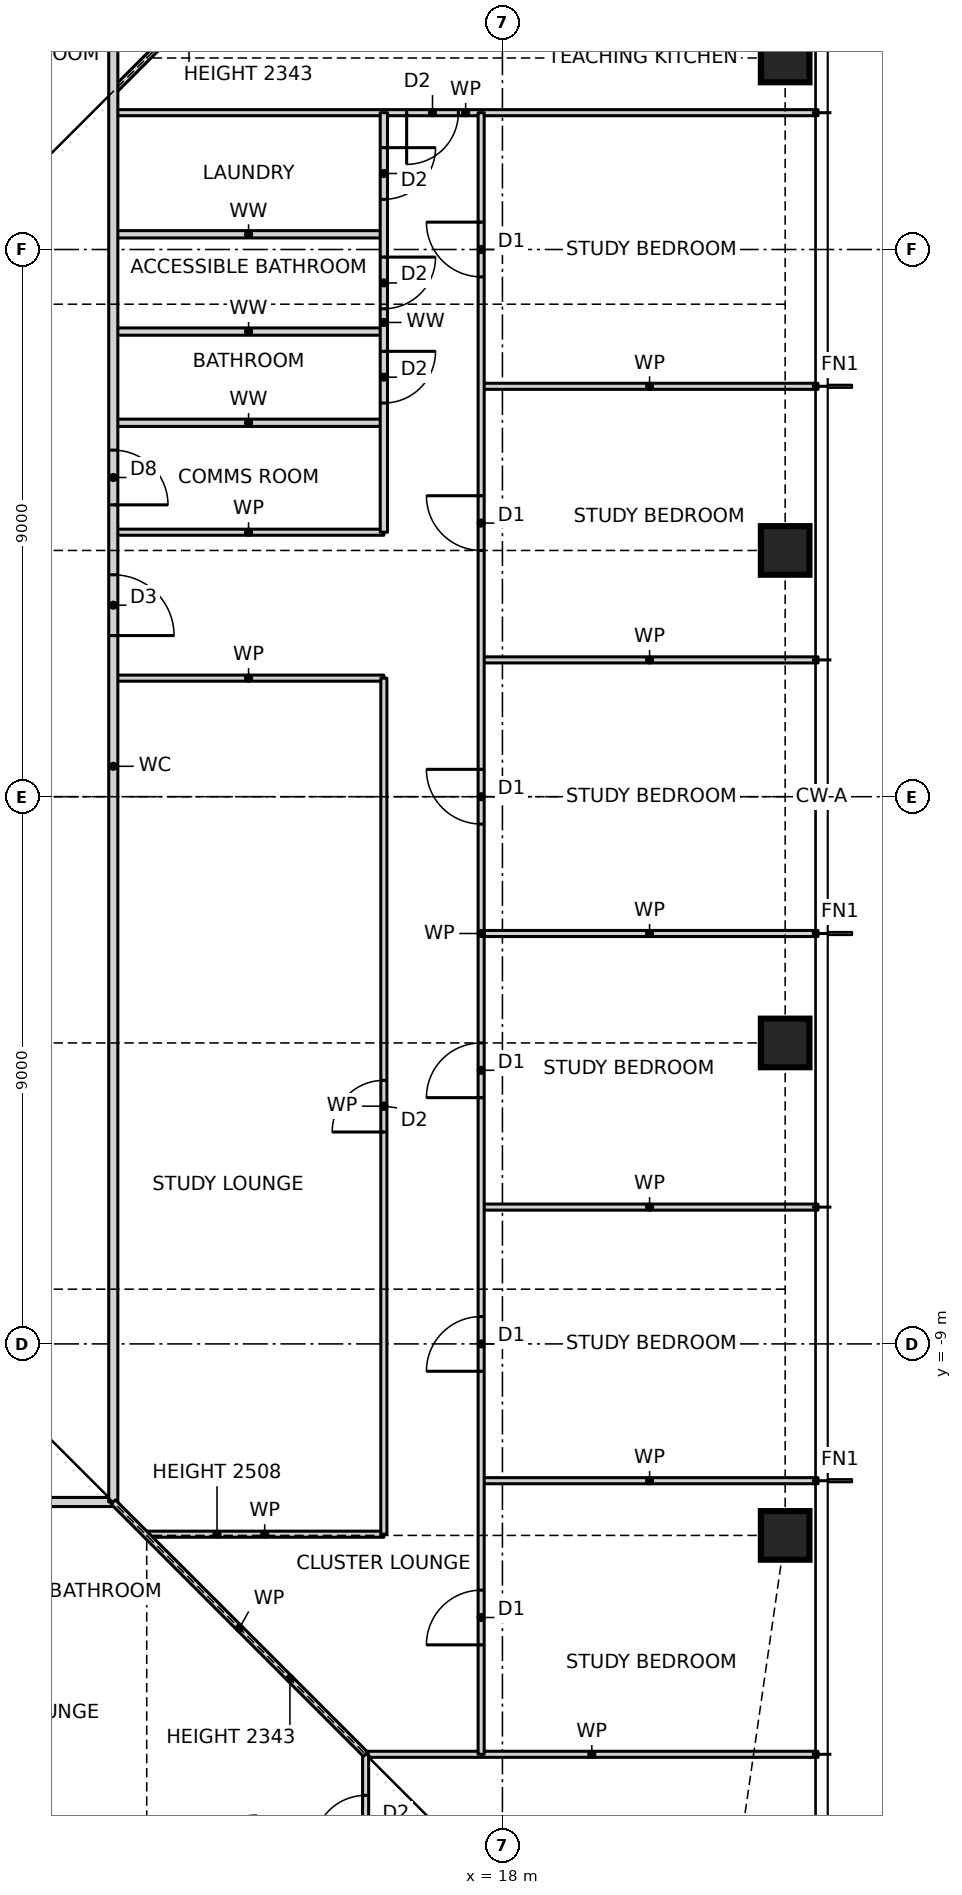
"""IFC4 building model, lengths in metres.
Left out: names, types, materials, properties, quantities, classifications, styles, units other than length and angle.
Written with IfcOpenShell. Run it as: python <this file> out.ifc"""

import sys

from ifc_helpers import new_model, si_unit, direction, frame, frame_2d, origin, origin_2d, place, context, subcontext, project, spatial, rectangle, hollow_rectangle, extrude, element, fill, save


model = new_model("IFC4")
c1 = context("Model", 3, precision=1e-05, world=origin(), true_north=direction((0.0, 1.0)))
c2 = subcontext(c1, "Body", "Model", "MODEL_VIEW")
j1 = project(units=[si_unit("LENGTHUNIT", "METRE"), si_unit("PLANEANGLEUNIT", "RADIAN")], contexts=[c1])
p1 = place(None, origin())
s1 = spatial("IfcSite", under=j1, at=p1, CompositionType="ELEMENT")
p2 = place(p1, origin())
s2 = spatial("IfcBuilding", under=s1, at=p2, CompositionType="ELEMENT")
p3 = place(p2, frame((0.0, 0.0, 64.0)))
s3 = spatial("IfcBuildingStorey", under=s2, at=p3, CompositionType="ELEMENT", Elevation=64.0)
for number, where, z_axis, x_axis in (
    (1, (22.65, -12.15, 0.0), (0.0, 0.0, 1.0), (1.0, 0.0, 0.0)),
    (2, (22.65, -4.05, 0.0), (0.0, 0.0, 1.0), (1.0, 0.0, 0.0)),
    (3, (22.65, 4.05, 0.0), (0.0, 0.0, 1.0), (1.0, 0.0, 0.0)),
    (4, (22.65, 12.15, 0.0), (0.0, 0.0, 1.0), (1.0, 0.0, 0.0)),
):
    element("IfcColumn", number, at=place(p3, frame(where, z_axis=z_axis, x_axis=x_axis)), inside=s3, PredefinedType="COLUMN", context=c2, shape_type="SweptSolid", body=[
        extrude(hollow_rectangle(XDim=0.8, YDim=0.8, WallThickness=0.09, at=origin_2d()), origin(), (0.0, 0.0, 1.0), 3.5),
    ])
p4 = place(p3, frame((15.75, -15.75, 0.0), z_axis=(0.0, 0.0, 1.0), x_axis=(1.0, 0.0, 0.0)))
e5 = element("IfcWall", 5, at=p4, inside=s3, PredefinedType="PARTITIONING", context=c2, shape_type="SweptSolid", body=[
    extrude(rectangle(XDim=7.44, YDim=0.1, at=frame_2d((3.72, 0.0))), origin(), (0.0, 0.0, 1.0), 3.27),
])
p5 = place(p3, frame((12.13, -12.13, 0.0), z_axis=(0.0, 0.0, 1.0), x_axis=(1.0, 0.0, 0.0)))
e6 = element("IfcWall", 6, at=p5, inside=s3, PredefinedType="PARTITIONING", context=c2, shape_type="SweptSolid", body=[
    extrude(rectangle(XDim=3.92, YDim=0.1, at=frame_2d((1.96, 0.0))), origin(), (0.0, 0.0, 1.0), 2.508),
])
p6 = place(p3, frame((-11.6, -11.6, 0.0), z_axis=(0.0, 0.0, 1.0), x_axis=(1.0, 0.0, 0.0)))
e7 = element("IfcWall", 7, at=p6, inside=s3, PredefinedType="PARTITIONING", context=c2, shape_type="SweptSolid", body=[
    extrude(rectangle(XDim=23.2, YDim=0.15, at=frame_2d((11.6, 0.0))), origin(), (0.0, 0.0, 1.0), 3.27),
])
p7 = place(p6, frame((1.755, 0.0, 0.0)))
e8 = element("IfcOpeningElement", 8, at=p7, cuts=e7, PredefinedType="OPENING", context=c2, shape_type="SweptSolid", body=[
    extrude(rectangle(XDim=1.0, YDim=2.1, at=frame_2d((0.5, 1.05))), frame((0.0, 0.085, 0.0), z_axis=(0.0, -1.0, 0.0), x_axis=(1.0, 0.0, 0.0)), (0.0, 0.0, 1.0), 0.17),
])
p8 = place(p6, frame((21.025, 0.0, 0.0)))
e9 = element("IfcOpeningElement", 9, at=p8, cuts=e7, PredefinedType="OPENING", context=c2, shape_type="SweptSolid", body=[
    extrude(rectangle(XDim=1.0, YDim=2.1, at=frame_2d((0.5, 1.05))), frame((0.0, 0.085, 0.0), z_axis=(0.0, -1.0, 0.0), x_axis=(1.0, 0.0, 0.0)), (0.0, 0.0, 1.0), 0.17),
])
for number, where, z_axis, x_axis in (
    (10, (17.65, -11.25, 0.0), (0.0, 0.0, 1.0), (1.0, 0.0, 0.0)),
    (11, (17.65, -6.75, 0.0), (0.0, 0.0, 1.0), (1.0, 0.0, 0.0)),
    (12, (17.65, -2.25, 0.0), (0.0, 0.0, 1.0), (1.0, 0.0, 0.0)),
):
    element("IfcWall", number, at=place(p3, frame(where, z_axis=z_axis, x_axis=x_axis)), inside=s3, PredefinedType="PARTITIONING", context=c2, shape_type="SweptSolid", body=[
        extrude(rectangle(XDim=5.54, YDim=0.1, at=frame_2d((2.77, 0.0))), origin(), (0.0, 0.0, 1.0), 3.27),
    ])
p9 = place(p3, frame((11.6, 1.95, 0.0), z_axis=(0.0, 0.0, 1.0), x_axis=(1.0, 0.0, 0.0)))
e13 = element("IfcWall", 13, at=p9, inside=s3, PredefinedType="PARTITIONING", context=c2, shape_type="SweptSolid", body=[
    extrude(rectangle(XDim=4.45, YDim=0.1, at=frame_2d((2.225, 0.0))), origin(), (0.0, 0.0, 1.0), 3.27),
])
p10 = place(p3, frame((17.65, 2.25, 0.0), z_axis=(0.0, 0.0, 1.0), x_axis=(1.0, 0.0, 0.0)))
e14 = element("IfcWall", 14, at=p10, inside=s3, PredefinedType="PARTITIONING", context=c2, shape_type="SweptSolid", body=[
    extrude(rectangle(XDim=5.54, YDim=0.1, at=frame_2d((2.77, 0.0))), origin(), (0.0, 0.0, 1.0), 3.27),
])
p11 = place(p3, frame((11.6, 4.35, 0.0), z_axis=(0.0, 0.0, 1.0), x_axis=(1.0, 0.0, 0.0)))
e15 = element("IfcWall", 15, at=p11, inside=s3, PredefinedType="PARTITIONING", context=c2, shape_type="SweptSolid", body=[
    extrude(rectangle(XDim=4.45, YDim=0.1, at=frame_2d((2.225, 0.0))), origin(), (0.0, 0.0, 1.0), 3.27),
])
p12 = place(p3, frame((11.6, 6.15, 0.0), z_axis=(0.0, 0.0, 1.0), x_axis=(1.0, 0.0, 0.0)))
e16 = element("IfcWall", 16, at=p12, inside=s3, PredefinedType="PARTITIONING", context=c2, shape_type="SweptSolid", body=[
    extrude(rectangle(XDim=4.45, YDim=0.12, at=frame_2d((2.225, 0.0))), origin(), (0.0, 0.0, 1.0), 3.27),
])
p13 = place(p3, frame((17.65, 6.75, 0.0), z_axis=(0.0, 0.0, 1.0), x_axis=(1.0, 0.0, 0.0)))
e17 = element("IfcWall", 17, at=p13, inside=s3, PredefinedType="PARTITIONING", context=c2, shape_type="SweptSolid", body=[
    extrude(rectangle(XDim=5.54, YDim=0.1, at=frame_2d((2.77, 0.0))), origin(), (0.0, 0.0, 1.0), 3.27),
])
for number, where, z_axis, x_axis in (
    (18, (11.6, 7.65, 0.0), (0.0, 0.0, 1.0), (1.0, 0.0, 0.0)),
    (19, (11.6, 9.25, 0.0), (0.0, 0.0, 1.0), (1.0, 0.0, 0.0)),
):
    element("IfcWall", number, at=place(p3, frame(where, z_axis=z_axis, x_axis=x_axis)), inside=s3, PredefinedType="PARTITIONING", context=c2, shape_type="SweptSolid", body=[
        extrude(rectangle(XDim=4.45, YDim=0.12, at=frame_2d((2.225, 0.0))), origin(), (0.0, 0.0, 1.0), 3.27),
    ])
p14 = place(p3, frame((11.6, 11.25, 0.0), z_axis=(0.0, 0.0, 1.0), x_axis=(1.0, 0.0, 0.0)))
e20 = element("IfcWall", 20, at=p14, inside=s3, PredefinedType="PARTITIONING", context=c2, shape_type="SweptSolid", body=[
    extrude(rectangle(XDim=11.59, YDim=0.1, at=frame_2d((5.795, 0.0))), origin(), (0.0, 0.0, 1.0), 3.27),
])
p15 = place(p14, frame((4.825, 0.0, 0.0)))
e21 = element("IfcOpeningElement", 21, at=p15, cuts=e20, PredefinedType="OPENING", context=c2, shape_type="SweptSolid", body=[
    extrude(rectangle(XDim=0.85, YDim=2.1, at=frame_2d((0.425, 1.05))), frame((0.0, 0.06, 0.0), z_axis=(0.0, -1.0, 0.0), x_axis=(1.0, 0.0, 0.0)), (0.0, 0.0, 1.0), 0.12),
])
p16 = place(p3, frame((11.6, 11.6, 0.0), z_axis=(0.0, 0.0, 1.0), x_axis=(0.707106781187, 0.707106781187, 0.0)))
e22 = element("IfcWall", 22, at=p16, inside=s3, PredefinedType="PARTITIONING", context=c2, shape_type="SweptSolid", body=[
    extrude(rectangle(XDim=5.869, YDim=0.1, at=frame_2d((2.935, 0.0))), origin(), (0.0, 0.0, 1.0), 2.343),
])
p17 = place(p3, frame((17.65, -15.75, 0.0), z_axis=(0.0, 0.0, 1.0), x_axis=(0.0, 1.0, 0.0)))
e23 = element("IfcWall", 23, at=p17, inside=s3, PredefinedType="PARTITIONING", context=c2, shape_type="SweptSolid", body=[
    extrude(rectangle(XDim=27.0, YDim=0.1, at=frame_2d((13.5, 0.0))), origin(), (0.0, 0.0, 1.0), 3.27),
])
p18 = place(p17, frame((1.8, 0.0, 0.0)))
e24 = element("IfcOpeningElement", 24, at=p18, cuts=e23, PredefinedType="OPENING", context=c2, shape_type="SweptSolid", body=[
    extrude(rectangle(XDim=0.9, YDim=2.1, at=frame_2d((0.45, 1.05))), frame((0.0, 0.06, 0.0), z_axis=(0.0, -1.0, 0.0), x_axis=(1.0, 0.0, 0.0)), (0.0, 0.0, 1.0), 0.12),
])
p19 = place(p17, frame((6.3, 0.0, 0.0)))
e25 = element("IfcOpeningElement", 25, at=p19, cuts=e23, PredefinedType="OPENING", context=c2, shape_type="SweptSolid", body=[
    extrude(rectangle(XDim=0.9, YDim=2.1, at=frame_2d((0.45, 1.05))), frame((0.0, 0.06, 0.0), z_axis=(0.0, -1.0, 0.0), x_axis=(1.0, 0.0, 0.0)), (0.0, 0.0, 1.0), 0.12),
])
p20 = place(p17, frame((10.8, 0.0, 0.0)))
e26 = element("IfcOpeningElement", 26, at=p20, cuts=e23, PredefinedType="OPENING", context=c2, shape_type="SweptSolid", body=[
    extrude(rectangle(XDim=0.9, YDim=2.1, at=frame_2d((0.45, 1.05))), frame((0.0, 0.06, 0.0), z_axis=(0.0, -1.0, 0.0), x_axis=(1.0, 0.0, 0.0)), (0.0, 0.0, 1.0), 0.12),
])
p21 = place(p17, frame((15.3, 0.0, 0.0)))
e27 = element("IfcOpeningElement", 27, at=p21, cuts=e23, PredefinedType="OPENING", context=c2, shape_type="SweptSolid", body=[
    extrude(rectangle(XDim=0.9, YDim=2.1, at=frame_2d((0.45, 1.05))), frame((0.0, 0.06, 0.0), z_axis=(0.0, -1.0, 0.0), x_axis=(1.0, 0.0, 0.0)), (0.0, 0.0, 1.0), 0.12),
])
p22 = place(p17, frame((19.8, 0.0, 0.0)))
e28 = element("IfcOpeningElement", 28, at=p22, cuts=e23, PredefinedType="OPENING", context=c2, shape_type="SweptSolid", body=[
    extrude(rectangle(XDim=0.9, YDim=2.1, at=frame_2d((0.45, 1.05))), frame((0.0, 0.06, 0.0), z_axis=(0.0, -1.0, 0.0), x_axis=(1.0, 0.0, 0.0)), (0.0, 0.0, 1.0), 0.12),
])
p23 = place(p17, frame((24.3, 0.0, 0.0)))
e29 = element("IfcOpeningElement", 29, at=p23, cuts=e23, PredefinedType="OPENING", context=c2, shape_type="SweptSolid", body=[
    extrude(rectangle(XDim=0.9, YDim=2.1, at=frame_2d((0.45, 1.05))), frame((0.0, 0.06, 0.0), z_axis=(0.0, -1.0, 0.0), x_axis=(1.0, 0.0, 0.0)), (0.0, 0.0, 1.0), 0.12),
])
p24 = place(p3, frame((16.05, -12.13, 0.0), z_axis=(0.0, 0.0, 1.0), x_axis=(0.0, 1.0, 0.0)))
e30 = element("IfcWall", 30, at=p24, inside=s3, PredefinedType="PARTITIONING", context=c2, shape_type="SweptSolid", body=[
    extrude(rectangle(XDim=14.08, YDim=0.1, at=frame_2d((7.04, 0.0))), origin(), (0.0, 0.0, 1.0), 3.27),
])
p25 = place(p24, frame((6.615, 0.0, 0.0)))
e31 = element("IfcOpeningElement", 31, at=p25, cuts=e30, PredefinedType="OPENING", context=c2, shape_type="SweptSolid", body=[
    extrude(rectangle(XDim=0.85, YDim=2.1, at=frame_2d((0.425, 1.05))), frame((0.0, 0.06, 0.0), z_axis=(0.0, -1.0, 0.0), x_axis=(1.0, 0.0, 0.0)), (0.0, 0.0, 1.0), 0.12),
])
p26 = place(p3, frame((16.05, 4.35, 0.0), z_axis=(0.0, 0.0, 1.0), x_axis=(0.0, 1.0, 0.0)))
e32 = element("IfcWall", 32, at=p26, inside=s3, PredefinedType="PARTITIONING", context=c2, shape_type="SweptSolid", body=[
    extrude(rectangle(XDim=6.9, YDim=0.12, at=frame_2d((3.45, 0.0))), origin(), (0.0, 0.0, 1.0), 3.27),
])
p27 = place(p26, frame((2.125, 0.0, 0.0)))
e33 = element("IfcOpeningElement", 33, at=p27, cuts=e32, PredefinedType="OPENING", context=c2, shape_type="SweptSolid", body=[
    extrude(rectangle(XDim=0.85, YDim=2.1, at=frame_2d((0.425, 1.05))), frame((0.0, 0.07, 0.0), z_axis=(0.0, -1.0, 0.0), x_axis=(1.0, 0.0, 0.0)), (0.0, 0.0, 1.0), 0.14),
])
p28 = place(p26, frame((3.675, 0.0, 0.0)))
e34 = element("IfcOpeningElement", 34, at=p28, cuts=e32, PredefinedType="OPENING", context=c2, shape_type="SweptSolid", body=[
    extrude(rectangle(XDim=0.85, YDim=2.1, at=frame_2d((0.425, 1.05))), frame((0.0, 0.07, 0.0), z_axis=(0.0, -1.0, 0.0), x_axis=(1.0, 0.0, 0.0)), (0.0, 0.0, 1.0), 0.14),
])
p29 = place(p26, frame((5.475, 0.0, 0.0)))
e35 = element("IfcOpeningElement", 35, at=p29, cuts=e32, PredefinedType="OPENING", context=c2, shape_type="SweptSolid", body=[
    extrude(rectangle(XDim=0.85, YDim=2.1, at=frame_2d((0.425, 1.05))), frame((0.0, 0.07, 0.0), z_axis=(0.0, -1.0, 0.0), x_axis=(1.0, 0.0, 0.0)), (0.0, 0.0, 1.0), 0.14),
])
p30 = place(p3, frame((15.75, -23.19, 0.0), z_axis=(0.0, 0.0, 1.0), x_axis=(0.0, 1.0, 0.0)))
e36 = element("IfcWall", 36, at=p30, inside=s3, PredefinedType="PARTITIONING", context=c2, shape_type="SweptSolid", body=[
    extrude(rectangle(XDim=7.44, YDim=0.1, at=frame_2d((3.72, 0.0))), origin(), (0.0, 0.0, 1.0), 3.27),
])
p31 = place(p30, frame((5.915, 0.0, 0.0)))
e37 = element("IfcOpeningElement", 37, at=p31, cuts=e36, PredefinedType="OPENING", context=c2, shape_type="SweptSolid", body=[
    extrude(rectangle(XDim=0.85, YDim=2.1, at=frame_2d((0.425, 1.05))), frame((0.0, 0.06, 0.0), z_axis=(0.0, -1.0, 0.0), x_axis=(1.0, 0.0, 0.0)), (0.0, 0.0, 1.0), 0.12),
])
p32 = place(p3, frame((11.6, -11.6, 0.0), z_axis=(0.0, 0.0, 1.0), x_axis=(0.0, 1.0, 0.0)))
e38 = element("IfcWall", 38, at=p32, inside=s3, PredefinedType="PARTITIONING", context=c2, shape_type="SweptSolid", body=[
    extrude(rectangle(XDim=24.2, YDim=0.15, at=frame_2d((12.1, 0.0))), origin(), (0.0, 0.0, 1.0), 3.27),
])
p33 = place(p32, frame((14.25, 0.0, 0.0)))
e39 = element("IfcOpeningElement", 39, at=p33, cuts=e38, PredefinedType="OPENING", context=c2, shape_type="SweptSolid", body=[
    extrude(rectangle(XDim=1.0, YDim=2.1, at=frame_2d((0.5, 1.05))), frame((0.0, 0.085, 0.0), z_axis=(0.0, -1.0, 0.0), x_axis=(1.0, 0.0, 0.0)), (0.0, 0.0, 1.0), 0.17),
])
p34 = place(p32, frame((16.4, 0.0, 0.0)))
e40 = element("IfcOpeningElement", 40, at=p34, cuts=e38, PredefinedType="OPENING", context=c2, shape_type="SweptSolid", body=[
    extrude(rectangle(XDim=0.9, YDim=2.1, at=frame_2d((0.45, 1.05))), frame((0.0, 0.085, 0.0), z_axis=(0.0, -1.0, 0.0), x_axis=(1.0, 0.0, 0.0)), (0.0, 0.0, 1.0), 0.17),
])
p35 = place(p3, frame((15.75, -15.75, 0.0), z_axis=(0.0, 0.0, 1.0), x_axis=(-0.707106781187, 0.707106781187, 0.0)))
e41 = element("IfcWall", 41, at=p35, inside=s3, PredefinedType="PARTITIONING", context=c2, shape_type="SweptSolid", body=[
    extrude(rectangle(XDim=5.869, YDim=0.1, at=frame_2d((2.935, 0.0))), origin(), (0.0, 0.0, 1.0), 2.343),
])
p36 = place(p18, origin())
e42 = element("IfcDoor", 42, at=p36, inside=s3, OperationType="SINGLE_SWING_LEFT", PredefinedType="DOOR", context=c2, shape_type="SweptSolid", body=[
    extrude(rectangle(XDim=0.9, YDim=2.1, at=frame_2d((0.45, 1.05))), frame((0.0, 0.025, 0.0), z_axis=(0.0, -1.0, 0.0), x_axis=(1.0, 0.0, 0.0)), (0.0, 0.0, 1.0), 0.05),
])
fill(e24, e42)
p37 = place(p19, origin())
e43 = element("IfcDoor", 43, at=p37, inside=s3, OperationType="SINGLE_SWING_LEFT", PredefinedType="DOOR", context=c2, shape_type="SweptSolid", body=[
    extrude(rectangle(XDim=0.9, YDim=2.1, at=frame_2d((0.45, 1.05))), frame((0.0, 0.025, 0.0), z_axis=(0.0, -1.0, 0.0), x_axis=(1.0, 0.0, 0.0)), (0.0, 0.0, 1.0), 0.05),
])
fill(e25, e43)
p38 = place(p20, origin())
e44 = element("IfcDoor", 44, at=p38, inside=s3, OperationType="SINGLE_SWING_LEFT", PredefinedType="DOOR", context=c2, shape_type="SweptSolid", body=[
    extrude(rectangle(XDim=0.9, YDim=2.1, at=frame_2d((0.45, 1.05))), frame((0.0, 0.025, 0.0), z_axis=(0.0, -1.0, 0.0), x_axis=(1.0, 0.0, 0.0)), (0.0, 0.0, 1.0), 0.05),
])
fill(e26, e44)
p39 = place(p21, origin())
e45 = element("IfcDoor", 45, at=p39, inside=s3, OperationType="SINGLE_SWING_RIGHT", PredefinedType="DOOR", context=c2, shape_type="SweptSolid", body=[
    extrude(rectangle(XDim=0.9, YDim=2.1, at=frame_2d((0.45, 1.05))), frame((0.0, 0.025, 0.0), z_axis=(0.0, -1.0, 0.0), x_axis=(1.0, 0.0, 0.0)), (0.0, 0.0, 1.0), 0.05),
])
fill(e27, e45)
p40 = place(p22, origin())
e46 = element("IfcDoor", 46, at=p40, inside=s3, OperationType="SINGLE_SWING_RIGHT", PredefinedType="DOOR", context=c2, shape_type="SweptSolid", body=[
    extrude(rectangle(XDim=0.9, YDim=2.1, at=frame_2d((0.45, 1.05))), frame((0.0, 0.025, 0.0), z_axis=(0.0, -1.0, 0.0), x_axis=(1.0, 0.0, 0.0)), (0.0, 0.0, 1.0), 0.05),
])
fill(e28, e46)
p41 = place(p23, origin())
e47 = element("IfcDoor", 47, at=p41, inside=s3, OperationType="SINGLE_SWING_RIGHT", PredefinedType="DOOR", context=c2, shape_type="SweptSolid", body=[
    extrude(rectangle(XDim=0.9, YDim=2.1, at=frame_2d((0.45, 1.05))), frame((0.0, 0.025, 0.0), z_axis=(0.0, -1.0, 0.0), x_axis=(1.0, 0.0, 0.0)), (0.0, 0.0, 1.0), 0.05),
])
fill(e29, e47)
p42 = place(p33, frame((1.0, 0.0, 0.0), z_axis=(0.0, 0.0, 1.0), x_axis=(-1.0, 0.0, 0.0)))
e48 = element("IfcDoor", 48, at=p42, inside=s3, OperationType="SINGLE_SWING_RIGHT", PredefinedType="DOOR", context=c2, shape_type="SweptSolid", body=[
    extrude(rectangle(XDim=1.0, YDim=2.1, at=frame_2d((0.5, 1.05))), frame((0.0, 0.025, 0.0), z_axis=(0.0, -1.0, 0.0), x_axis=(1.0, 0.0, 0.0)), (0.0, 0.0, 1.0), 0.05),
])
fill(e39, e48)
p43 = place(p25, origin())
e49 = element("IfcDoor", 49, at=p43, inside=s3, OperationType="SINGLE_SWING_LEFT", PredefinedType="DOOR", context=c2, shape_type="SweptSolid", body=[
    extrude(rectangle(XDim=0.85, YDim=2.1, at=frame_2d((0.425, 1.05))), frame((0.0, 0.025, 0.0), z_axis=(0.0, -1.0, 0.0), x_axis=(1.0, 0.0, 0.0)), (0.0, 0.0, 1.0), 0.05),
])
fill(e31, e49)
p44 = place(p34, frame((0.9, 0.0, 0.0), z_axis=(0.0, 0.0, 1.0), x_axis=(-1.0, 0.0, 0.0)))
e50 = element("IfcDoor", 50, at=p44, inside=s3, OperationType="SINGLE_SWING_RIGHT", PredefinedType="DOOR", context=c2, shape_type="SweptSolid", body=[
    extrude(rectangle(XDim=0.9, YDim=2.1, at=frame_2d((0.45, 1.05))), frame((0.0, 0.025, 0.0), z_axis=(0.0, -1.0, 0.0), x_axis=(1.0, 0.0, 0.0)), (0.0, 0.0, 1.0), 0.05),
])
fill(e40, e50)
p45 = place(p27, frame((0.85, 0.0, 0.0), z_axis=(0.0, 0.0, 1.0), x_axis=(-1.0, 0.0, 0.0)))
e51 = element("IfcDoor", 51, at=p45, inside=s3, OperationType="SINGLE_SWING_LEFT", PredefinedType="DOOR", context=c2, shape_type="SweptSolid", body=[
    extrude(rectangle(XDim=0.85, YDim=2.1, at=frame_2d((0.425, 1.05))), frame((0.0, 0.025, 0.0), z_axis=(0.0, -1.0, 0.0), x_axis=(1.0, 0.0, 0.0)), (0.0, 0.0, 1.0), 0.05),
])
fill(e33, e51)
p46 = place(p28, frame((0.85, 0.0, 0.0), z_axis=(0.0, 0.0, 1.0), x_axis=(-1.0, 0.0, 0.0)))
e52 = element("IfcDoor", 52, at=p46, inside=s3, OperationType="SINGLE_SWING_LEFT", PredefinedType="DOOR", context=c2, shape_type="SweptSolid", body=[
    extrude(rectangle(XDim=0.85, YDim=2.1, at=frame_2d((0.425, 1.05))), frame((0.0, 0.025, 0.0), z_axis=(0.0, -1.0, 0.0), x_axis=(1.0, 0.0, 0.0)), (0.0, 0.0, 1.0), 0.05),
])
fill(e34, e52)
p47 = place(p29, frame((0.85, 0.0, 0.0), z_axis=(0.0, 0.0, 1.0), x_axis=(-1.0, 0.0, 0.0)))
e53 = element("IfcDoor", 53, at=p47, inside=s3, OperationType="SINGLE_SWING_LEFT", PredefinedType="DOOR", context=c2, shape_type="SweptSolid", body=[
    extrude(rectangle(XDim=0.85, YDim=2.1, at=frame_2d((0.425, 1.05))), frame((0.0, 0.025, 0.0), z_axis=(0.0, -1.0, 0.0), x_axis=(1.0, 0.0, 0.0)), (0.0, 0.0, 1.0), 0.05),
])
fill(e35, e53)
p48 = place(p15, frame((0.85, 0.0, 0.0), z_axis=(0.0, 0.0, 1.0), x_axis=(-1.0, 0.0, 0.0)))
e54 = element("IfcDoor", 54, at=p48, inside=s3, OperationType="SINGLE_SWING_RIGHT", PredefinedType="DOOR", context=c2, shape_type="SweptSolid", body=[
    extrude(rectangle(XDim=0.85, YDim=2.1, at=frame_2d((0.425, 1.05))), frame((0.0, 0.025, 0.0), z_axis=(0.0, -1.0, 0.0), x_axis=(1.0, 0.0, 0.0)), (0.0, 0.0, 1.0), 0.05),
])
fill(e21, e54)
p49 = place(p31, origin())
e55 = element("IfcDoor", 55, at=p49, inside=s3, OperationType="SINGLE_SWING_LEFT", PredefinedType="DOOR", context=c2, shape_type="SweptSolid", body=[
    extrude(rectangle(XDim=0.85, YDim=2.1, at=frame_2d((0.425, 1.05))), frame((0.0, 0.025, 0.0), z_axis=(0.0, -1.0, 0.0), x_axis=(1.0, 0.0, 0.0)), (0.0, 0.0, 1.0), 0.05),
])
fill(e37, e55)
save(model, sys.argv[1])
